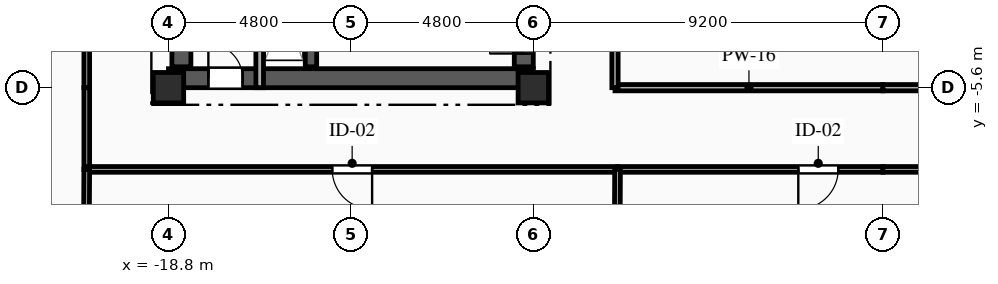
"""IFC4 building model, lengths in metres.
Left out: names, types, materials, properties, quantities, classifications, styles, units other than length and angle.
Written with IfcOpenShell. Run it as: python <this file> out.ifc"""

import sys

from ifc_helpers import new_model, si_unit, direction, frame, frame_2d, origin, origin_2d, place, context, subcontext, project, spatial, rectangle, extrude, element, fill, save


model = new_model("IFC4")
c1 = context("Model", 3, precision=1e-05, world=origin(), true_north=direction((0.0, 1.0)))
c2 = subcontext(c1, "Body", "Model", "MODEL_VIEW")
j1 = project(units=[si_unit("LENGTHUNIT", "METRE"), si_unit("PLANEANGLEUNIT", "RADIAN")], contexts=[c1])
p1 = place(None, origin())
s1 = spatial("IfcSite", under=j1, at=p1, CompositionType="ELEMENT")
p2 = place(p1, origin())
s2 = spatial("IfcBuilding", under=s1, at=p2, CompositionType="ELEMENT")
p3 = place(p2, frame((0.0, 0.0, 196.4)))
s3 = spatial("IfcBuildingStorey", under=s2, at=p3, CompositionType="ELEMENT", Elevation=196.4)
for number, where, z_axis, x_axis in (
    (1, (-18.8, -5.6, 0.0), (0.0, 0.0, 1.0), (1.0, 0.0, 0.0)),
    (2, (-9.2, -5.6, 0.0), (0.0, 0.0, 1.0), (1.0, 0.0, 0.0)),
):
    element("IfcColumn", number, at=place(p3, frame(where, z_axis=z_axis, x_axis=x_axis)), inside=s3, PredefinedType="COLUMN", context=c2, shape_type="SweptSolid", body=[
        extrude(rectangle(XDim=0.8, YDim=0.8, at=origin_2d()), origin(), (0.0, 0.0, 1.0), 3.35),
    ])
p4 = place(p3, frame((-18.8, -5.35, 0.0), z_axis=(0.0, 0.0, 1.0), x_axis=(1.0, 0.0, 0.0)))
e3 = element("IfcWall", 3, at=p4, inside=s3, PredefinedType="SHEAR", context=c2, shape_type="SweptSolid", body=[
    extrude(rectangle(XDim=9.6, YDim=0.5, at=frame_2d((4.8, 0.0))), origin(), (0.0, 0.0, 1.0), 3.04),
])
p5 = place(p4, frame((1.05, 0.0, 0.0)))
e4 = element("IfcOpeningElement", 4, at=p5, cuts=e3, PredefinedType="OPENING", context=c2, shape_type="SweptSolid", body=[
    extrude(rectangle(XDim=0.9, YDim=2.1, at=frame_2d((0.45, 1.05))), frame((0.0, 0.26, 0.0), z_axis=(0.0, -1.0, 0.0), x_axis=(1.0, 0.0, 0.0)), (0.0, 0.0, 1.0), 0.52),
])
p6 = place(p3, frame((-18.46, -5.05, 0.0), z_axis=(0.0, 0.0, 1.0), x_axis=(0.0, 1.0, 0.0)))
e5 = element("IfcWall", 5, at=p6, inside=s3, PredefinedType="SHEAR", context=c2, shape_type="SweptSolid", body=[
    extrude(rectangle(XDim=10.1, YDim=0.5, at=frame_2d((5.05, 0.0))), origin(), (0.0, 0.0, 1.0), 3.04),
])
p7 = place(p3, frame((-9.45, -5.05, 0.0), z_axis=(0.0, 0.0, 1.0), x_axis=(0.0, 1.0, 0.0)))
e6 = element("IfcWall", 6, at=p7, inside=s3, PredefinedType="SHEAR", context=c2, shape_type="SweptSolid", body=[
    extrude(rectangle(XDim=10.1, YDim=0.5, at=frame_2d((5.05, 0.0))), origin(), (0.0, 0.0, 1.0), 3.04),
])
p8 = place(p7, frame((7.15, 0.0, 0.0)))
e7 = element("IfcOpeningElement", 7, at=p8, cuts=e6, PredefinedType="OPENING", context=c2, shape_type="SweptSolid", body=[
    extrude(rectangle(XDim=0.9, YDim=2.1, at=frame_2d((0.45, 1.05))), frame((0.0, 0.26, 0.0), z_axis=(0.0, -1.0, 0.0), x_axis=(1.0, 0.0, 0.0)), (0.0, 0.0, 1.0), 0.52),
])
p9 = place(p7, frame((2.4, 0.0, 0.0)))
e8 = element("IfcOpeningElement", 8, at=p9, cuts=e6, PredefinedType="OPENING", context=c2, shape_type="SweptSolid", body=[
    extrude(rectangle(XDim=1.2, YDim=2.15, at=frame_2d((0.6, 1.075))), frame((0.0, 0.26, 0.0), z_axis=(0.0, -1.0, 0.0), x_axis=(1.0, 0.0, 0.0)), (0.0, 0.0, 1.0), 0.52),
])
p10 = place(p7, frame((0.35, 0.0, 0.0)))
e9 = element("IfcOpeningElement", 9, at=p10, cuts=e6, PredefinedType="OPENING", context=c2, shape_type="SweptSolid", body=[
    extrude(rectangle(XDim=0.9, YDim=2.1, at=frame_2d((0.45, 1.05))), frame((0.0, 0.26, 0.0), z_axis=(0.0, -1.0, 0.0), x_axis=(1.0, 0.0, 0.0)), (0.0, 0.0, 1.0), 0.52),
])
p11 = place(p7, frame((5.0, 0.0, 0.0)))
e10 = element("IfcOpeningElement", 10, at=p11, cuts=e6, PredefinedType="OPENING", context=c2, shape_type="SweptSolid", body=[
    extrude(rectangle(XDim=0.9, YDim=2.1, at=frame_2d((0.45, 1.05))), frame((0.0, 0.26, 0.0), z_axis=(0.0, -1.0, 0.0), x_axis=(1.0, 0.0, 0.0)), (0.0, 0.0, 1.0), 0.52),
])
p12 = place(p3, frame((-15.05, -5.05, 0.0), z_axis=(0.0, 0.0, 1.0), x_axis=(0.0, 1.0, 0.0)))
e11 = element("IfcWall", 11, at=p12, inside=s3, PredefinedType="SHEAR", context=c2, shape_type="SweptSolid", body=[
    extrude(rectangle(XDim=10.1, YDim=0.3, at=frame_2d((5.05, 0.0))), origin(), (0.0, 0.0, 1.0), 3.04),
])
p13 = place(p3, frame((-16.4, -5.6, 0.0), z_axis=(0.0, 0.0, 1.0), x_axis=(0.0, 1.0, 0.0)))
e12 = element("IfcWall", 12, at=p13, inside=s3, PredefinedType="PARTITIONING", context=c2, shape_type="SweptSolid", body=[
    extrude(rectangle(XDim=3.49, YDim=0.2, at=frame_2d((1.745, 0.0))), origin(), (0.0, 0.0, 1.0), 3.04),
])
p14 = place(p3, frame((-20.95, -7.75, 0.0), z_axis=(0.0, 0.0, 1.0), x_axis=(0.0, 1.0, 0.0)))
e13 = element("IfcWall", 13, at=p14, inside=s3, PredefinedType="PARTITIONING", context=c2, shape_type="SweptSolid", body=[
    extrude(rectangle(XDim=2.15, YDim=0.15, at=frame_2d((1.075, 0.0))), origin(), (0.0, 0.0, 1.0), 3.04),
])
p15 = place(p3, frame((-6.983, -7.75, 0.0), z_axis=(0.0, 0.0, 1.0), x_axis=(-1.0, 0.0, 0.0)))
e14 = element("IfcWall", 14, at=p15, inside=s3, PredefinedType="PARTITIONING", context=c2, shape_type="SweptSolid", body=[
    extrude(rectangle(XDim=13.967, YDim=0.15, at=frame_2d((6.983, 0.0))), origin(), (0.0, 0.0, 1.0), 3.04),
])
p16 = place(p15, frame((6.458, 0.0, 0.0)))
e15 = element("IfcOpeningElement", 15, at=p16, cuts=e14, PredefinedType="OPENING", context=c2, shape_type="SweptSolid", body=[
    extrude(rectangle(XDim=1.05, YDim=2.15, at=frame_2d((0.525, 1.075))), frame((0.0, 0.085, 0.0), z_axis=(0.0, -1.0, 0.0), x_axis=(1.0, 0.0, 0.0)), (0.0, 0.0, 1.0), 0.17),
])
p17 = place(p3, frame((0.0, -7.75, 0.0), z_axis=(0.0, 0.0, 1.0), x_axis=(-1.0, 0.0, 0.0)))
e16 = element("IfcWall", 16, at=p17, inside=s3, PredefinedType="PARTITIONING", context=c2, shape_type="SweptSolid", body=[
    extrude(rectangle(XDim=6.983, YDim=0.15, at=frame_2d((3.491, 0.0))), origin(), (0.0, 0.0, 1.0), 3.04),
])
p18 = place(p17, frame((1.177, 0.0, 0.0)))
e17 = element("IfcOpeningElement", 17, at=p18, cuts=e16, PredefinedType="OPENING", context=c2, shape_type="SweptSolid", body=[
    extrude(rectangle(XDim=1.05, YDim=2.15, at=frame_2d((0.525, 1.075))), frame((0.0, 0.085, 0.0), z_axis=(0.0, -1.0, 0.0), x_axis=(1.0, 0.0, 0.0)), (0.0, 0.0, 1.0), 0.17),
])
p19 = place(p3, frame((-7.05, -5.6, 0.0), z_axis=(0.0, 0.0, 1.0), x_axis=(1.0, 0.0, 0.0)))
e18 = element("IfcWall", 18, at=p19, inside=s3, PredefinedType="PARTITIONING", context=c2, shape_type="SweptSolid", body=[
    extrude(rectangle(XDim=7.05, YDim=0.165, at=frame_2d((3.525, 0.0))), origin(), (0.0, 0.0, 1.0), 2.525),
])
p20 = place(p3, frame((6.983, -7.75, 0.0), z_axis=(0.0, 0.0, 1.0), x_axis=(-1.0, 0.0, 0.0)))
e19 = element("IfcWall", 19, at=p20, inside=s3, PredefinedType="PARTITIONING", context=c2, shape_type="SweptSolid", body=[
    extrude(rectangle(XDim=6.983, YDim=0.15, at=frame_2d((3.491, 0.0))), origin(), (0.0, 0.0, 1.0), 3.04),
])
p21 = place(p3, frame((0.0, -5.6, 0.0), z_axis=(0.0, 0.0, 1.0), x_axis=(1.0, 0.0, 0.0)))
e20 = element("IfcWall", 20, at=p21, inside=s3, PredefinedType="PARTITIONING", context=c2, shape_type="SweptSolid", body=[
    extrude(rectangle(XDim=7.05, YDim=0.165, at=frame_2d((3.525, 0.0))), origin(), (0.0, 0.0, 1.0), 2.525),
])
p22 = place(p3, frame((-20.95, -5.6, 0.0), z_axis=(0.0, 0.0, 1.0), x_axis=(0.0, 1.0, 0.0)))
e21 = element("IfcWall", 21, at=p22, inside=s3, PredefinedType="PARTITIONING", context=c2, shape_type="SweptSolid", body=[
    extrude(rectangle(XDim=7.867, YDim=0.15, at=frame_2d((3.934, 0.0))), origin(), (0.0, 0.0, 1.0), 3.04),
])
p23 = place(p22, frame((4.823, 0.0, 0.0)))
e22 = element("IfcOpeningElement", 22, at=p23, cuts=e21, PredefinedType="OPENING", context=c2, shape_type="SweptSolid", body=[
    extrude(rectangle(XDim=1.05, YDim=2.15, at=frame_2d((0.525, 1.075))), frame((0.0, 0.085, 0.0), z_axis=(0.0, -1.0, 0.0), x_axis=(1.0, 0.0, 0.0)), (0.0, 0.0, 1.0), 0.17),
])
p24 = place(p3, frame((-7.05, -2.95, 0.0), z_axis=(0.0, 0.0, 1.0), x_axis=(0.0, -1.0, 0.0)))
e23 = element("IfcWall", 23, at=p24, inside=s3, PredefinedType="PARTITIONING", context=c2, shape_type="SweptSolid", body=[
    extrude(rectangle(XDim=2.65, YDim=0.165, at=frame_2d((1.325, 0.0))), origin(), (0.0, 0.0, 1.0), 3.04),
])
p25 = place(p3, frame((-20.95, -7.75, 0.0), z_axis=(0.0, 0.0, 1.0), x_axis=(-0.005804668564, -0.99998315277, 0.0)))
e24 = element("IfcWall", 24, at=p25, inside=s3, PredefinedType="PARTITIONING", context=c2, shape_type="SweptSolid", body=[
    extrude(rectangle(XDim=7.571, YDim=0.15, at=frame_2d((3.785, 0.0))), origin(), (0.0, 0.0, 1.0), 3.04),
])
p26 = place(p3, frame((-6.983, -7.75, 0.0), z_axis=(0.0, 0.0, 1.0), x_axis=(-0.004861916497, -0.999988180814, 0.0)))
e25 = element("IfcWall", 25, at=p26, inside=s3, PredefinedType="PARTITIONING", context=c2, shape_type="SweptSolid", body=[
    extrude(rectangle(XDim=9.039, YDim=0.15, at=frame_2d((4.519, 0.0))), origin(), (0.0, 0.0, 1.0), 3.04),
])
p27 = place(p5, origin())
e26 = element("IfcDoor", 26, at=p27, inside=s3, OperationType="SINGLE_SWING_LEFT", PredefinedType="DOOR", context=c2, shape_type="SweptSolid", body=[
    extrude(rectangle(XDim=0.9, YDim=2.1, at=frame_2d((0.45, 1.05))), frame((0.0, 0.025, 0.0), z_axis=(0.0, -1.0, 0.0), x_axis=(1.0, 0.0, 0.0)), (0.0, 0.0, 1.0), 0.05),
])
fill(e4, e26)
p28 = place(p10, origin())
e27 = element("IfcDoor", 27, at=p28, inside=s3, OperationType="SINGLE_SWING_LEFT", PredefinedType="DOOR", context=c2, shape_type="SweptSolid", body=[
    extrude(rectangle(XDim=0.9, YDim=2.1, at=frame_2d((0.45, 1.05))), frame((0.0, 0.025, 0.0), z_axis=(0.0, -1.0, 0.0), x_axis=(1.0, 0.0, 0.0)), (0.0, 0.0, 1.0), 0.05),
])
fill(e9, e27)
p29 = place(p16, origin())
e28 = element("IfcDoor", 28, at=p29, inside=s3, OperationType="SINGLE_SWING_LEFT", PredefinedType="DOOR", context=c2, shape_type="SweptSolid", body=[
    extrude(rectangle(XDim=1.05, YDim=2.15, at=frame_2d((0.525, 1.075))), frame((0.0, 0.025, 0.0), z_axis=(0.0, -1.0, 0.0), x_axis=(1.0, 0.0, 0.0)), (0.0, 0.0, 1.0), 0.05),
])
fill(e15, e28)
p30 = place(p18, origin())
e29 = element("IfcDoor", 29, at=p30, inside=s3, OperationType="SINGLE_SWING_RIGHT", PredefinedType="DOOR", context=c2, shape_type="SweptSolid", body=[
    extrude(rectangle(XDim=1.05, YDim=2.15, at=frame_2d((0.525, 1.075))), frame((0.0, 0.025, 0.0), z_axis=(0.0, -1.0, 0.0), x_axis=(1.0, 0.0, 0.0)), (0.0, 0.0, 1.0), 0.05),
])
fill(e17, e29)
save(model, sys.argv[1])
